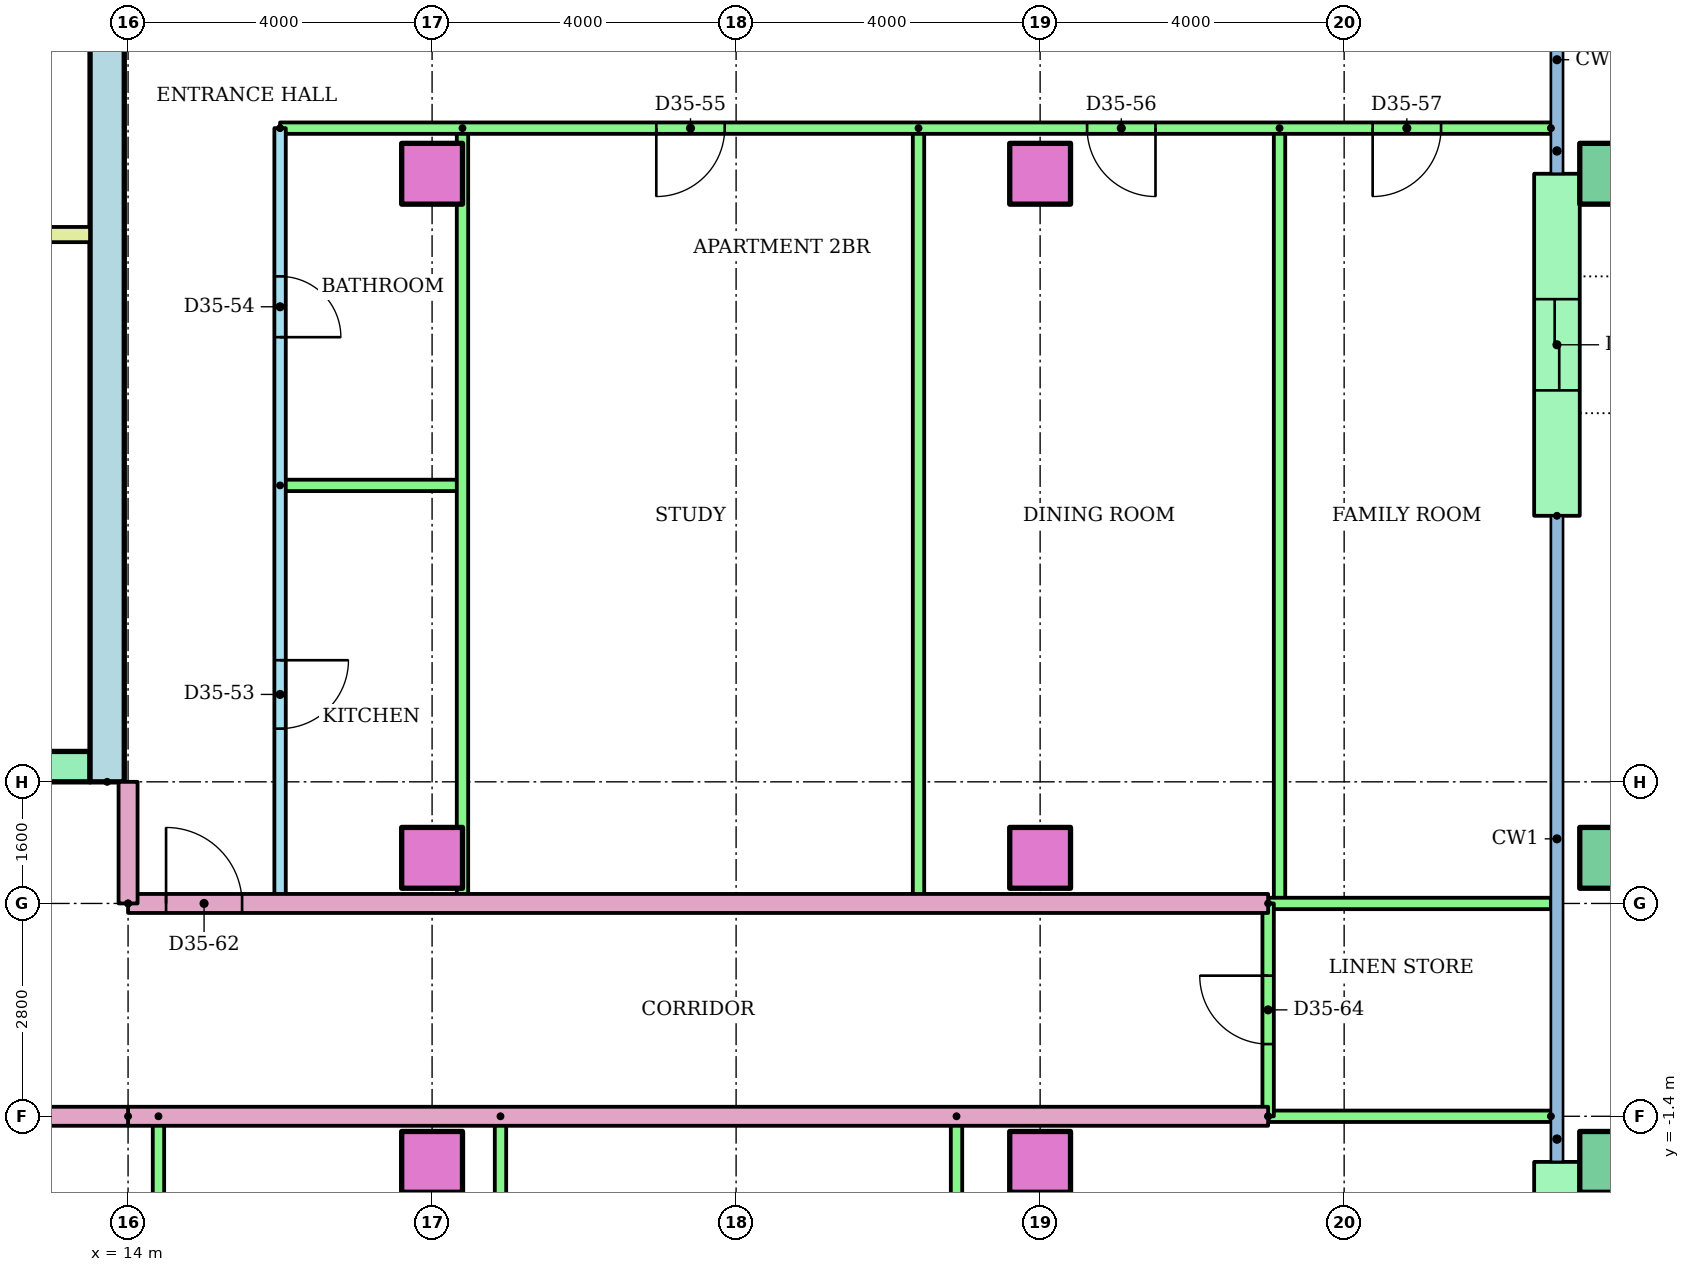
"""IFC4 building model, lengths in metres.
Left out: names, types, materials, properties, quantities, classifications, styles, units other than length and angle.
Written with IfcOpenShell. Run it as: python <this file> out.ifc"""

import sys

from ifc_helpers import new_model, si_unit, direction, frame, frame_2d, origin, origin_2d, place, context, subcontext, project, spatial, rectangle, hollow_rectangle, extrude, element, fill, save


model = new_model("IFC4")
c1 = context("Model", 3, precision=1e-05, world=origin(), true_north=direction((0.0, 1.0)))
c2 = subcontext(c1, "Body", "Model", "MODEL_VIEW")
j1 = project(units=[si_unit("LENGTHUNIT", "METRE"), si_unit("PLANEANGLEUNIT", "RADIAN")], contexts=[c1])
p1 = place(None, origin())
s1 = spatial("IfcSite", under=j1, at=p1, CompositionType="ELEMENT")
p2 = place(p1, origin())
s2 = spatial("IfcBuilding", under=s1, at=p2, CompositionType="ELEMENT")
p3 = place(p2, frame((0.0, 0.0, 135.8)))
s3 = spatial("IfcBuildingStorey", under=s2, at=p3, CompositionType="ELEMENT", Elevation=135.8)
for number, where in (
    (1, (18.0, -2.0, 0.0)),
    (2, (26.0, -2.0, 0.0)),
):
    element("IfcColumn", number, at=place(p3, frame(where)), inside=s3, PredefinedType="COLUMN", context=c2, shape_type="SweptSolid", body=[
        extrude(rectangle(XDim=0.8, YDim=0.8, at=origin_2d()), origin(), (0.0, 0.0, 1.0), 3.2),
    ])
p4 = place(p3, frame((33.5, -2.0, 0.0)))
e3 = element("IfcColumn", 3, at=p4, inside=s3, PredefinedType="COLUMN", context=c2, shape_type="SweptSolid", body=[
    extrude(hollow_rectangle(XDim=0.8, YDim=0.8, WallThickness=0.04, at=origin_2d()), origin(), (0.0, 0.0, 1.0), 3.2),
])
for number, where in (
    (4, (18.0, 2.0, 0.0)),
    (5, (26.0, 2.0, 0.0)),
):
    element("IfcColumn", number, at=place(p3, frame(where)), inside=s3, PredefinedType="COLUMN", context=c2, shape_type="SweptSolid", body=[
        extrude(rectangle(XDim=0.8, YDim=0.8, at=origin_2d()), origin(), (0.0, 0.0, 1.0), 3.2),
    ])
p5 = place(p3, frame((33.5, 2.0, 0.0)))
e6 = element("IfcColumn", 6, at=p5, inside=s3, PredefinedType="COLUMN", context=c2, shape_type="SweptSolid", body=[
    extrude(hollow_rectangle(XDim=0.8, YDim=0.8, WallThickness=0.04, at=origin_2d()), origin(), (0.0, 0.0, 1.0), 3.2),
])
for number, where in (
    (7, (18.0, 11.0, 0.0)),
    (8, (26.0, 11.0, 0.0)),
):
    element("IfcColumn", number, at=place(p3, frame(where)), inside=s3, PredefinedType="COLUMN", context=c2, shape_type="SweptSolid", body=[
        extrude(rectangle(XDim=0.8, YDim=0.8, at=origin_2d()), origin(), (0.0, 0.0, 1.0), 3.2),
    ])
p6 = place(p3, frame((33.5, 11.0, 0.0)))
e9 = element("IfcColumn", 9, at=p6, inside=s3, PredefinedType="COLUMN", context=c2, shape_type="SweptSolid", body=[
    extrude(hollow_rectangle(XDim=0.8, YDim=0.8, WallThickness=0.04, at=origin_2d()), origin(), (0.0, 0.0, 1.0), 3.2),
])
p7 = place(p3, frame((32.8, -5.7, 0.0), z_axis=(0.0, 0.0, 1.0), x_axis=(0.0, 1.0, 0.0)))
e10 = element("IfcWall", 10, at=p7, inside=s3, PredefinedType="STANDARD", context=c2, shape_type="SweptSolid", body=[
    extrude(rectangle(XDim=3.7, YDim=0.6, at=frame_2d((1.85, 0.0))), origin(), (0.0, 0.0, 1.0), 2.92),
])
p8 = place(p7, frame((1.25, 0.0, 0.0)))
e11 = element("IfcOpeningElement", 11, at=p8, cuts=e10, PredefinedType="OPENING", context=c2, shape_type="SweptSolid", body=[
    extrude(rectangle(XDim=1.2, YDim=2.1, at=frame_2d((0.6, 1.05))), frame((0.0, 0.31, 0.0), z_axis=(0.0, -1.0, 0.0), x_axis=(1.0, 0.0, 0.0)), (0.0, 0.0, 1.0), 0.62),
])
p9 = place(p3, frame((32.8, 6.5, 0.0), z_axis=(0.0, 0.0, 1.0), x_axis=(0.0, 1.0, 0.0)))
e12 = element("IfcWall", 12, at=p9, inside=s3, PredefinedType="STANDARD", context=c2, shape_type="SweptSolid", body=[
    extrude(rectangle(XDim=4.5, YDim=0.6, at=frame_2d((2.25, 0.0))), origin(), (0.0, 0.0, 1.0), 2.92),
])
p10 = place(p9, frame((1.65, 0.0, 0.0)))
e13 = element("IfcOpeningElement", 13, at=p10, cuts=e12, PredefinedType="OPENING", context=c2, shape_type="SweptSolid", body=[
    extrude(rectangle(XDim=1.2, YDim=2.1, at=frame_2d((0.6, 1.05))), frame((0.0, 0.31, 0.0), z_axis=(0.0, -1.0, 0.0), x_axis=(1.0, 0.0, 0.0)), (0.0, 0.0, 1.0), 0.62),
])
p11 = place(p3, frame((13.725, 3.0, 0.0), z_axis=(0.0, 0.0, 1.0), x_axis=(0.0, 1.0, 0.0)))
e14 = element("IfcWall", 14, at=p11, inside=s3, PredefinedType="SHEAR", context=c2, shape_type="SweptSolid", body=[
    extrude(rectangle(XDim=17.0, YDim=0.45, at=frame_2d((8.5, 0.0))), origin(), (0.0, 0.0, 1.0), 2.92),
])
p12 = place(p3, frame((-13.5, 3.2, 0.0)))
e15 = element("IfcWall", 15, at=p12, inside=s3, PredefinedType="SHEAR", context=c2, shape_type="SweptSolid", body=[
    extrude(rectangle(XDim=27.0, YDim=0.4, at=frame_2d((13.5, 0.0))), origin(), (0.0, 0.0, 1.0), 2.92),
])
p13 = place(p12, frame((6.861, 0.0, 0.0)))
e16 = element("IfcOpeningElement", 16, at=p13, cuts=e15, PredefinedType="OPENING", context=c2, shape_type="SweptSolid", body=[
    extrude(rectangle(XDim=1.1, YDim=2.1, at=frame_2d((0.55, 1.05))), frame((0.0, 0.21, 0.0), z_axis=(0.0, -1.0, 0.0), x_axis=(1.0, 0.0, 0.0)), (0.0, 0.0, 1.0), 0.42),
])
p14 = place(p12, frame((9.906, 0.0, 0.0)))
e17 = element("IfcOpeningElement", 17, at=p14, cuts=e15, PredefinedType="OPENING", context=c2, shape_type="SweptSolid", body=[
    extrude(rectangle(XDim=1.1, YDim=2.1, at=frame_2d((0.55, 1.05))), frame((0.0, 0.21, 0.0), z_axis=(0.0, -1.0, 0.0), x_axis=(1.0, 0.0, 0.0)), (0.0, 0.0, 1.0), 0.42),
])
p15 = place(p12, frame((15.994, 0.0, 0.0)))
e18 = element("IfcOpeningElement", 18, at=p15, cuts=e15, PredefinedType="OPENING", context=c2, shape_type="SweptSolid", body=[
    extrude(rectangle(XDim=1.1, YDim=2.1, at=frame_2d((0.55, 1.05))), frame((0.0, 0.21, 0.0), z_axis=(0.0, -1.0, 0.0), x_axis=(1.0, 0.0, 0.0)), (0.0, 0.0, 1.0), 0.42),
])
p16 = place(p12, frame((19.039, 0.0, 0.0)))
e19 = element("IfcOpeningElement", 19, at=p16, cuts=e15, PredefinedType="OPENING", context=c2, shape_type="SweptSolid", body=[
    extrude(rectangle(XDim=1.1, YDim=2.1, at=frame_2d((0.55, 1.05))), frame((0.0, 0.21, 0.0), z_axis=(0.0, -1.0, 0.0), x_axis=(1.0, 0.0, 0.0)), (0.0, 0.0, 1.0), 0.42),
])
p17 = place(p12, frame((12.6, 0.0, 0.0)))
e20 = element("IfcOpeningElement", 20, at=p17, cuts=e15, PredefinedType="OPENING", context=c2, shape_type="SweptSolid", body=[
    extrude(rectangle(XDim=1.8, YDim=2.1, at=frame_2d((0.9, 1.05))), frame((0.0, 0.21, 0.0), z_axis=(0.0, -1.0, 0.0), x_axis=(1.0, 0.0, 0.0)), (0.0, 0.0, 1.0), 0.42),
])
p18 = place(p3, frame((9.6, 10.2, 0.0)))
e21 = element("IfcWall", 21, at=p18, inside=s3, PredefinedType="PARTITIONING", context=c2, shape_type="SweptSolid", body=[
    extrude(rectangle(XDim=3.9, YDim=0.2, at=frame_2d((1.95, 0.0))), origin(), (0.0, 0.0, 1.0), 2.92),
])
for number, where, z_axis, x_axis in (
    (22, (14.4, -1.4, 0.0), (0.0, 0.0, 1.0), (0.0, -1.0, 0.0)),
    (23, (18.9, -1.4, 0.0), (0.0, 0.0, 1.0), (0.0, -1.0, 0.0)),
    (24, (24.9, -1.4, 0.0), (0.0, 0.0, 1.0), (0.0, -1.0, 0.0)),
):
    element("IfcWall", number, at=place(p3, frame(where, z_axis=z_axis, x_axis=x_axis)), inside=s3, PredefinedType="PARTITIONING", context=c2, shape_type="SweptSolid", body=[
        extrude(rectangle(XDim=7.8, YDim=0.15, at=frame_2d((3.9, 0.0))), origin(), (0.0, 0.0, 1.0), 2.4),
    ])
p19 = place(p3, frame((29.0, -1.4, 0.0), z_axis=(0.0, 0.0, 1.0), x_axis=(-1.0, 0.0, 0.0)))
e25 = element("IfcWall", 25, at=p19, inside=s3, PredefinedType="PARTITIONING", context=c2, shape_type="SweptSolid", body=[
    extrude(rectangle(XDim=15.0, YDim=0.25, at=frame_2d((7.5, 0.0))), origin(), (0.0, 0.0, 1.0), 2.4),
])
p20 = place(p3, frame((32.72, -1.4, 0.0), z_axis=(0.0, 0.0, 1.0), x_axis=(-1.0, 0.0, 0.0)))
e26 = element("IfcWall", 26, at=p20, inside=s3, PredefinedType="PARTITIONING", context=c2, shape_type="SweptSolid", body=[
    extrude(rectangle(XDim=3.72, YDim=0.15, at=frame_2d((1.86, 0.0))), origin(), (0.0, 0.0, 1.0), 2.4),
])
p21 = place(p3, frame((16.0, 11.6, 0.0), z_axis=(0.0, 0.0, 1.0), x_axis=(0.0, -1.0, 0.0)))
e27 = element("IfcWall", 27, at=p21, inside=s3, PredefinedType="PARTITIONING", context=c2, shape_type="SweptSolid", body=[
    extrude(rectangle(XDim=10.2, YDim=0.15, at=frame_2d((5.1, 0.0))), origin(), (0.0, 0.0, 1.0), 2.4),
])
p22 = place(p21, frame((7.0, 0.0, 0.0)))
e28 = element("IfcOpeningElement", 28, at=p22, cuts=e27, PredefinedType="OPENING", context=c2, shape_type="SweptSolid", body=[
    extrude(rectangle(XDim=0.9, YDim=2.1, at=frame_2d((0.45, 1.05))), frame((0.0, 0.085, 0.0), z_axis=(0.0, -1.0, 0.0), x_axis=(1.0, 0.0, 0.0)), (0.0, 0.0, 1.0), 0.17),
])
p23 = place(p21, frame((1.95, 0.0, 0.0)))
e29 = element("IfcOpeningElement", 29, at=p23, cuts=e27, PredefinedType="OPENING", context=c2, shape_type="SweptSolid", body=[
    extrude(rectangle(XDim=0.8, YDim=2.1, at=frame_2d((0.4, 1.05))), frame((0.0, 0.085, 0.0), z_axis=(0.0, -1.0, 0.0), x_axis=(1.0, 0.0, 0.0)), (0.0, 0.0, 1.0), 0.17),
])
p24 = place(p3, frame((16.0, 6.9, 0.0)))
e30 = element("IfcWall", 30, at=p24, inside=s3, PredefinedType="PARTITIONING", context=c2, shape_type="SweptSolid", body=[
    extrude(rectangle(XDim=2.4, YDim=0.15, at=frame_2d((1.2, 0.0))), origin(), (0.0, 0.0, 1.0), 2.4),
])
for number, where, z_axis, x_axis in (
    (31, (18.4, 11.6, 0.0), (0.0, 0.0, 1.0), (0.0, -1.0, 0.0)),
    (32, (24.4, 11.6, 0.0), (0.0, 0.0, 1.0), (0.0, -1.0, 0.0)),
    (33, (29.15, 11.6, 0.0), (0.0, 0.0, 1.0), (0.0, -1.0, 0.0)),
):
    element("IfcWall", number, at=place(p3, frame(where, z_axis=z_axis, x_axis=x_axis)), inside=s3, PredefinedType="PARTITIONING", context=c2, shape_type="SweptSolid", body=[
        extrude(rectangle(XDim=10.2, YDim=0.15, at=frame_2d((5.1, 0.0))), origin(), (0.0, 0.0, 1.0), 2.4),
    ])
p25 = place(p3, frame((32.72, 11.6, 0.0), z_axis=(0.0, 0.0, 1.0), x_axis=(-1.0, 0.0, 0.0)))
e34 = element("IfcWall", 34, at=p25, inside=s3, PredefinedType="PARTITIONING", context=c2, shape_type="SweptSolid", body=[
    extrude(rectangle(XDim=16.72, YDim=0.15, at=frame_2d((8.36, 0.0))), origin(), (0.0, 0.0, 1.0), 2.4),
])
p26 = place(p25, frame((10.87, 0.0, 0.0)))
e35 = element("IfcOpeningElement", 35, at=p26, cuts=e34, PredefinedType="OPENING", context=c2, shape_type="SweptSolid", body=[
    extrude(rectangle(XDim=0.9, YDim=2.1, at=frame_2d((0.45, 1.05))), frame((0.0, 0.085, 0.0), z_axis=(0.0, -1.0, 0.0), x_axis=(1.0, 0.0, 0.0)), (0.0, 0.0, 1.0), 0.17),
])
p27 = place(p25, frame((5.202, 0.0, 0.0)))
e36 = element("IfcOpeningElement", 36, at=p27, cuts=e34, PredefinedType="OPENING", context=c2, shape_type="SweptSolid", body=[
    extrude(rectangle(XDim=0.9, YDim=2.1, at=frame_2d((0.45, 1.05))), frame((0.0, 0.085, 0.0), z_axis=(0.0, -1.0, 0.0), x_axis=(1.0, 0.0, 0.0)), (0.0, 0.0, 1.0), 0.17),
])
p28 = place(p25, frame((1.445, 0.0, 0.0)))
e37 = element("IfcOpeningElement", 37, at=p28, cuts=e34, PredefinedType="OPENING", context=c2, shape_type="SweptSolid", body=[
    extrude(rectangle(XDim=0.9, YDim=2.1, at=frame_2d((0.45, 1.05))), frame((0.0, 0.085, 0.0), z_axis=(0.0, -1.0, 0.0), x_axis=(1.0, 0.0, 0.0)), (0.0, 0.0, 1.0), 0.17),
])
p29 = place(p3, frame((14.0, 1.4, 0.0)))
e38 = element("IfcWall", 38, at=p29, inside=s3, PredefinedType="PARTITIONING", context=c2, shape_type="SweptSolid", body=[
    extrude(rectangle(XDim=15.0, YDim=0.25, at=frame_2d((7.5, 0.0))), origin(), (0.0, 0.0, 1.0), 2.4),
])
p30 = place(p29, frame((0.5, 0.0, 0.0)))
e39 = element("IfcOpeningElement", 39, at=p30, cuts=e38, PredefinedType="OPENING", context=c2, shape_type="SweptSolid", body=[
    extrude(rectangle(XDim=1.0, YDim=2.1, at=frame_2d((0.5, 1.05))), frame((0.0, 0.135, 0.0), z_axis=(0.0, -1.0, 0.0), x_axis=(1.0, 0.0, 0.0)), (0.0, 0.0, 1.0), 0.27),
])
p31 = place(p3, frame((29.0, 1.4, 0.0)))
e40 = element("IfcWall", 40, at=p31, inside=s3, PredefinedType="PARTITIONING", context=c2, shape_type="SweptSolid", body=[
    extrude(rectangle(XDim=3.72, YDim=0.15, at=frame_2d((1.86, 0.0))), origin(), (0.0, 0.0, 1.0), 2.4),
])
p32 = place(p3, frame((29.0, -1.4, 0.0), z_axis=(0.0, 0.0, 1.0), x_axis=(0.0, 1.0, 0.0)))
e41 = element("IfcWall", 41, at=p32, inside=s3, PredefinedType="PARTITIONING", context=c2, shape_type="SweptSolid", body=[
    extrude(rectangle(XDim=2.8, YDim=0.15, at=frame_2d((1.4, 0.0))), origin(), (0.0, 0.0, 1.0), 2.4),
])
p33 = place(p32, frame((0.95, 0.0, 0.0)))
e42 = element("IfcOpeningElement", 42, at=p33, cuts=e41, PredefinedType="OPENING", context=c2, shape_type="SweptSolid", body=[
    extrude(rectangle(XDim=0.9, YDim=2.1, at=frame_2d((0.45, 1.05))), frame((0.0, 0.085, 0.0), z_axis=(0.0, -1.0, 0.0), x_axis=(1.0, 0.0, 0.0)), (0.0, 0.0, 1.0), 0.17),
])
p34 = place(p3, frame((14.0, -1.4, 0.0), z_axis=(0.0, 0.0, 1.0), x_axis=(-1.0, 0.0, 0.0)))
e43 = element("IfcWall", 43, at=p34, inside=s3, PredefinedType="PARTITIONING", context=c2, shape_type="SweptSolid", body=[
    extrude(rectangle(XDim=28.0, YDim=0.25, at=frame_2d((14.0, 0.0))), origin(), (0.0, 0.0, 1.0), 2.4),
])
p35 = place(p34, frame((20.618, 0.0, 0.0)))
e44 = element("IfcOpeningElement", 44, at=p35, cuts=e43, PredefinedType="OPENING", context=c2, shape_type="SweptSolid", body=[
    extrude(rectangle(XDim=1.0, YDim=2.1, at=frame_2d((0.5, 1.05))), frame((0.0, 0.135, 0.0), z_axis=(0.0, -1.0, 0.0), x_axis=(1.0, 0.0, 0.0)), (0.0, 0.0, 1.0), 0.27),
])
p36 = place(p34, frame((18.382, 0.0, 0.0)))
e45 = element("IfcOpeningElement", 45, at=p36, cuts=e43, PredefinedType="OPENING", context=c2, shape_type="SweptSolid", body=[
    extrude(rectangle(XDim=1.0, YDim=2.1, at=frame_2d((0.5, 1.05))), frame((0.0, 0.135, 0.0), z_axis=(0.0, -1.0, 0.0), x_axis=(1.0, 0.0, 0.0)), (0.0, 0.0, 1.0), 0.27),
])
p37 = place(p34, frame((2.382, 0.0, 0.0)))
e46 = element("IfcOpeningElement", 46, at=p37, cuts=e43, PredefinedType="OPENING", context=c2, shape_type="SweptSolid", body=[
    extrude(rectangle(XDim=1.0, YDim=2.1, at=frame_2d((0.5, 1.05))), frame((0.0, 0.135, 0.0), z_axis=(0.0, -1.0, 0.0), x_axis=(1.0, 0.0, 0.0)), (0.0, 0.0, 1.0), 0.27),
])
p38 = place(p3, frame((14.0, 1.4, 0.0), z_axis=(0.0, 0.0, 1.0), x_axis=(0.0, 1.0, 0.0)))
e47 = element("IfcWall", 47, at=p38, inside=s3, PredefinedType="PARTITIONING", context=c2, shape_type="SweptSolid", body=[
    extrude(rectangle(XDim=1.6, YDim=0.25, at=frame_2d((0.8, 0.0))), origin(), (0.0, 0.0, 1.0), 2.4),
])
p39 = place(p22, origin())
e48 = element("IfcDoor", 48, at=p39, inside=s3, OperationType="SINGLE_SWING_LEFT", PredefinedType="DOOR", context=c2, shape_type="SweptSolid", body=[
    extrude(rectangle(XDim=0.9, YDim=2.1, at=frame_2d((0.45, 1.05))), frame((0.0, 0.025, 0.0), z_axis=(0.0, -1.0, 0.0), x_axis=(1.0, 0.0, 0.0)), (0.0, 0.0, 1.0), 0.05),
])
fill(e28, e48)
p40 = place(p23, origin())
e49 = element("IfcDoor", 49, at=p40, inside=s3, OperationType="SINGLE_SWING_RIGHT", PredefinedType="DOOR", context=c2, shape_type="SweptSolid", body=[
    extrude(rectangle(XDim=0.8, YDim=2.1, at=frame_2d((0.4, 1.05))), frame((0.0, 0.025, 0.0), z_axis=(0.0, -1.0, 0.0), x_axis=(1.0, 0.0, 0.0)), (0.0, 0.0, 1.0), 0.05),
])
fill(e29, e49)
p41 = place(p26, origin())
e50 = element("IfcDoor", 50, at=p41, inside=s3, OperationType="SINGLE_SWING_RIGHT", PredefinedType="DOOR", context=c2, shape_type="SweptSolid", body=[
    extrude(rectangle(XDim=0.9, YDim=2.1, at=frame_2d((0.45, 1.05))), frame((0.0, 0.025, 0.0), z_axis=(0.0, -1.0, 0.0), x_axis=(1.0, 0.0, 0.0)), (0.0, 0.0, 1.0), 0.05),
])
fill(e35, e50)
p42 = place(p27, origin())
e51 = element("IfcDoor", 51, at=p42, inside=s3, OperationType="SINGLE_SWING_LEFT", PredefinedType="DOOR", context=c2, shape_type="SweptSolid", body=[
    extrude(rectangle(XDim=0.9, YDim=2.1, at=frame_2d((0.45, 1.05))), frame((0.0, 0.025, 0.0), z_axis=(0.0, -1.0, 0.0), x_axis=(1.0, 0.0, 0.0)), (0.0, 0.0, 1.0), 0.05),
])
fill(e36, e51)
p43 = place(p28, origin())
e52 = element("IfcDoor", 52, at=p43, inside=s3, OperationType="SINGLE_SWING_RIGHT", PredefinedType="DOOR", context=c2, shape_type="SweptSolid", body=[
    extrude(rectangle(XDim=0.9, YDim=2.1, at=frame_2d((0.45, 1.05))), frame((0.0, 0.025, 0.0), z_axis=(0.0, -1.0, 0.0), x_axis=(1.0, 0.0, 0.0)), (0.0, 0.0, 1.0), 0.05),
])
fill(e37, e52)
p44 = place(p30, origin())
e53 = element("IfcDoor", 53, at=p44, inside=s3, OperationType="SINGLE_SWING_LEFT", PredefinedType="DOOR", context=c2, shape_type="SweptSolid", body=[
    extrude(rectangle(XDim=1.0, YDim=2.1, at=frame_2d((0.5, 1.05))), frame((0.0, 0.025, 0.0), z_axis=(0.0, -1.0, 0.0), x_axis=(1.0, 0.0, 0.0)), (0.0, 0.0, 1.0), 0.05),
])
fill(e39, e53)
p45 = place(p33, origin())
e54 = element("IfcDoor", 54, at=p45, inside=s3, OperationType="SINGLE_SWING_RIGHT", PredefinedType="DOOR", context=c2, shape_type="SweptSolid", body=[
    extrude(rectangle(XDim=0.9, YDim=2.1, at=frame_2d((0.45, 1.05))), frame((0.0, 0.025, 0.0), z_axis=(0.0, -1.0, 0.0), x_axis=(1.0, 0.0, 0.0)), (0.0, 0.0, 1.0), 0.05),
])
fill(e42, e54)
p46 = place(p10, origin())
e55 = element("IfcDoor", 55, at=p46, inside=s3, OperationType="SLIDING_TO_LEFT", PredefinedType="DOOR", context=c2, shape_type="SweptSolid", body=[
    extrude(rectangle(XDim=1.2, YDim=2.1, at=frame_2d((0.6, 1.05))), frame((0.0, 0.025, 0.0), z_axis=(0.0, -1.0, 0.0), x_axis=(1.0, 0.0, 0.0)), (0.0, 0.0, 1.0), 0.05),
])
fill(e13, e55)
save(model, sys.argv[1])
